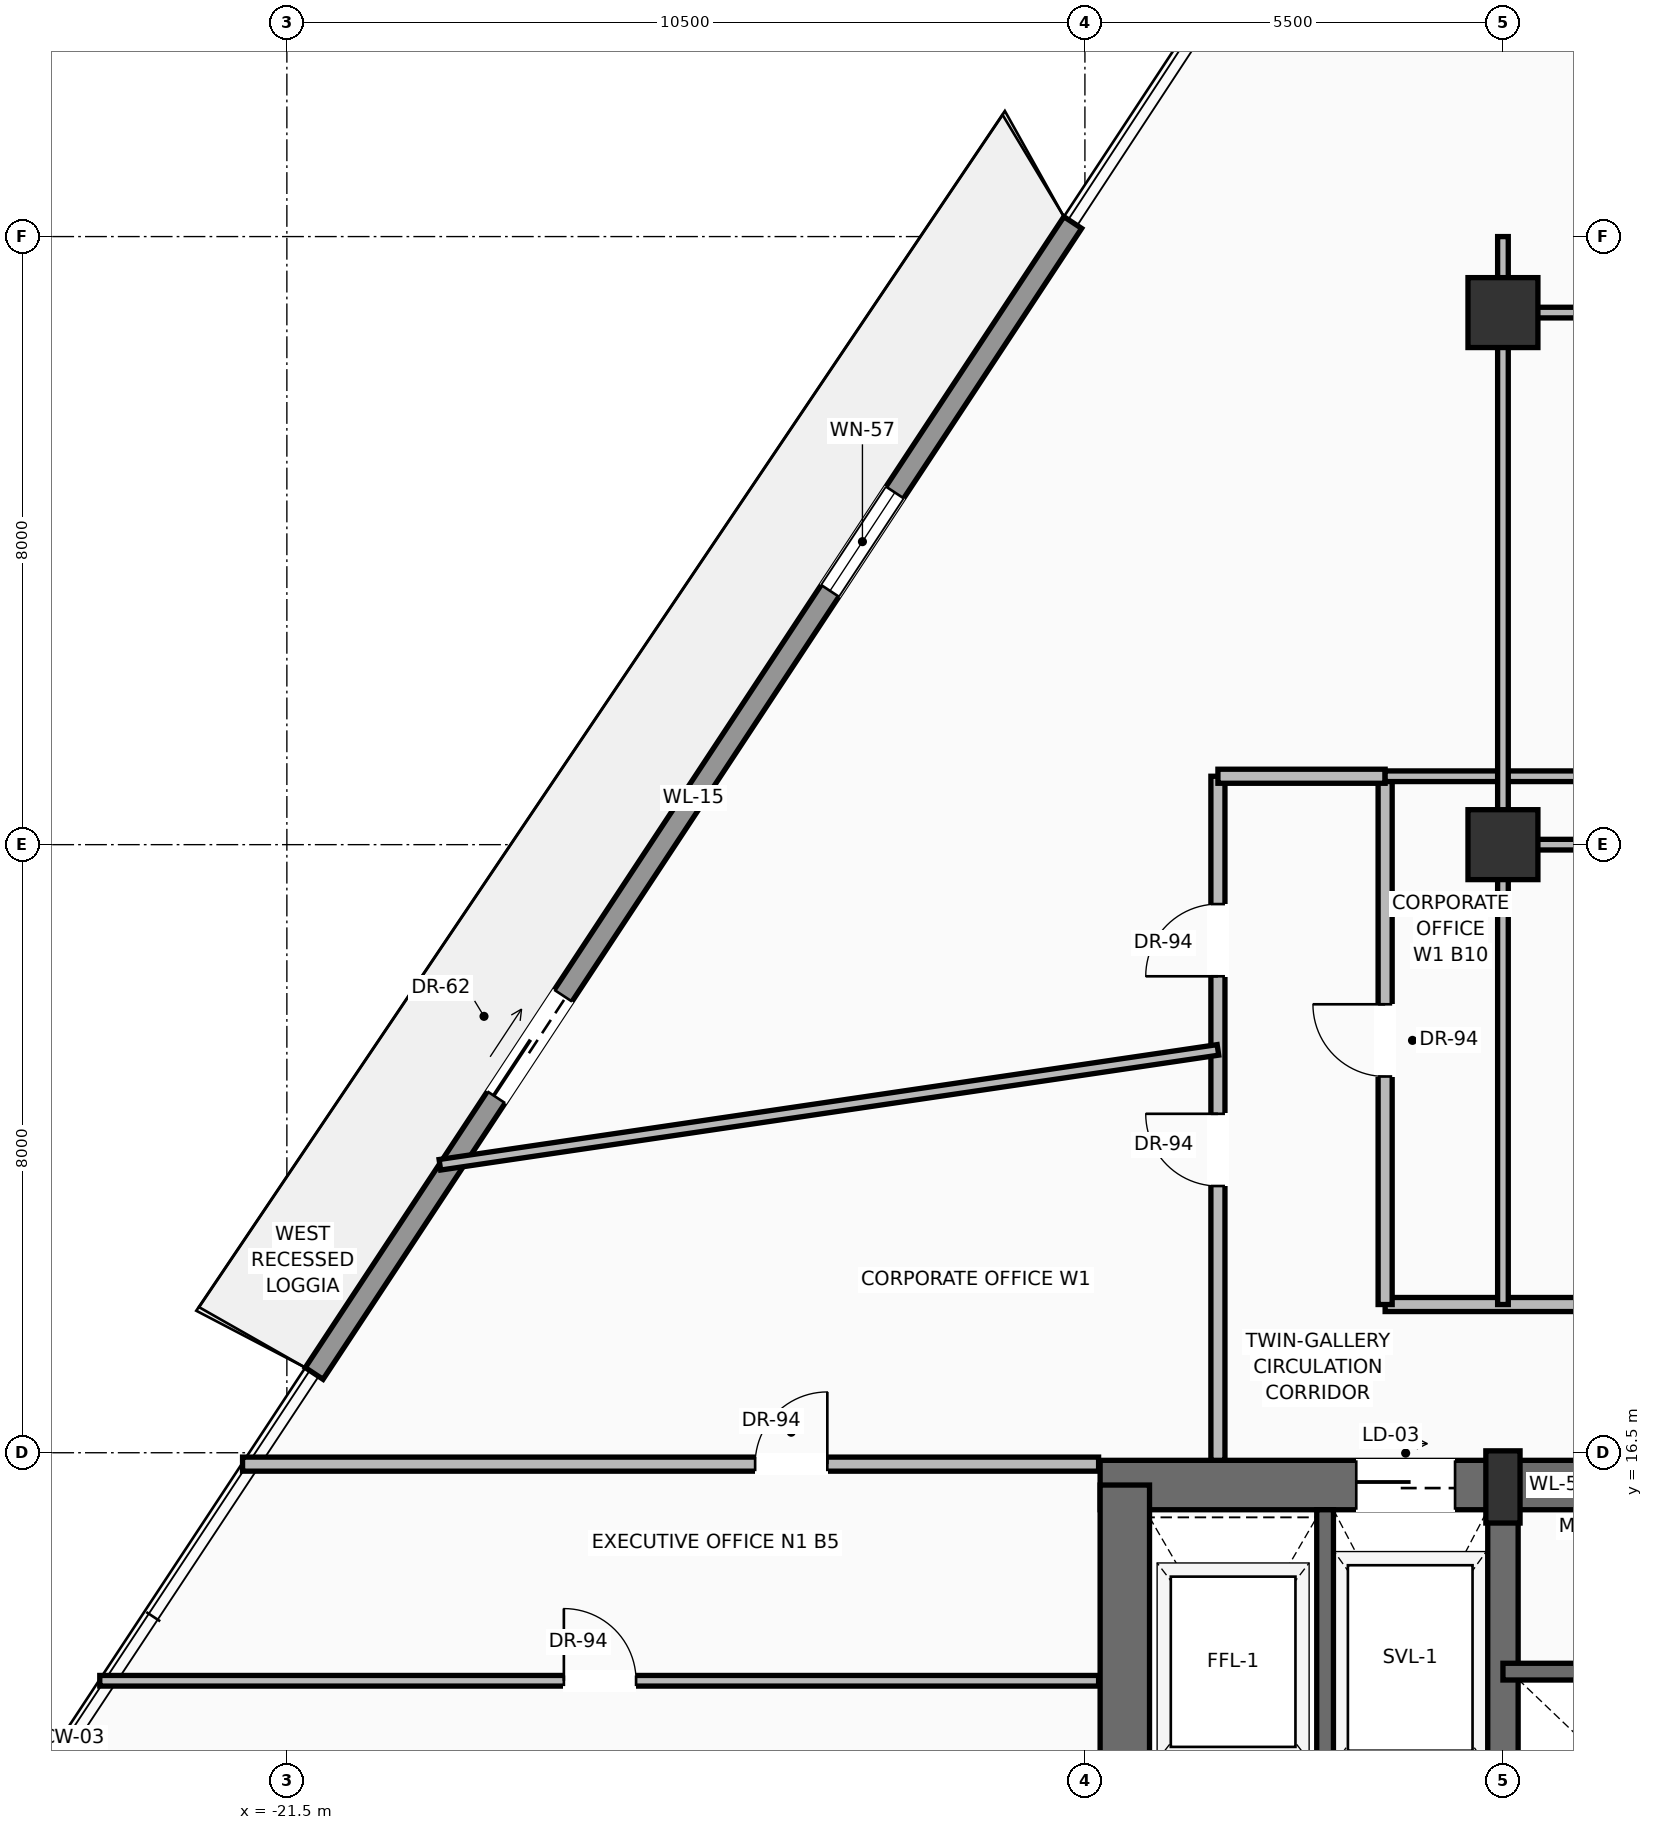
"""IFC4 building model, lengths in metres.
Left out: names, types, materials, properties, quantities, classifications, styles, units other than length and angle.
Written with IfcOpenShell. Run it as: python <this file> out.ifc"""

import sys

from ifc_helpers import new_model, si_unit, direction, frame, frame_2d, origin, origin_2d, place, context, subcontext, project, spatial, rectangle, extrude, source, transform, mapped, element, fill, save


model = new_model("IFC4")
c1 = context("Model", 3, precision=1e-05, world=origin(), true_north=direction((0.0, 1.0)))
c2 = subcontext(c1, "Body", "Model", "MODEL_VIEW")
j1 = project(units=[si_unit("LENGTHUNIT", "METRE"), si_unit("PLANEANGLEUNIT", "RADIAN")], contexts=[c1])
p1 = place(None, origin())
s1 = spatial("IfcSite", under=j1, at=p1, CompositionType="ELEMENT")
p2 = place(p1, origin())
s2 = spatial("IfcBuilding", under=s1, at=p2, CompositionType="ELEMENT")
p3 = place(p2, frame((0.0, 0.0, 125.6)))
s3 = spatial("IfcBuildingStorey", under=s2, at=p3, CompositionType="ELEMENT", Elevation=125.6)
p4 = place(p3, frame((-10.8, 16.075, 0.0), z_axis=(0.0, 0.0, 1.0), x_axis=(1.0, 0.0, 0.0)))
e1 = element("IfcWall", 1, at=p4, inside=s3, PredefinedType="SHEAR", context=c2, shape_type="SweptSolid", body=[
    extrude(rectangle(XDim=21.6, YDim=0.65, at=frame_2d((10.8, 0.0))), origin(), (0.0, 0.0, 1.0), 3.47),
])
p5 = place(p4, frame((3.37, 0.0, 0.0)))
e2 = element("IfcOpeningElement", 2, at=p5, cuts=e1, PredefinedType="OPENING", context=c2, shape_type="SweptSolid", body=[
    extrude(rectangle(XDim=1.3, YDim=2.3, at=frame_2d((0.65, 1.15))), frame((0.0, 0.335, 0.0), z_axis=(0.0, -1.0, 0.0), x_axis=(1.0, 0.0, 0.0)), (0.0, 0.0, 1.0), 0.67),
])
p6 = place(p4, frame((9.8, 0.0, 0.0)))
e3 = element("IfcOpeningElement", 3, at=p6, cuts=e1, PredefinedType="OPENING", context=c2, shape_type="SweptSolid", body=[
    extrude(rectangle(XDim=2.0, YDim=2.4, at=frame_2d((1.0, 1.2))), frame((0.0, 0.335, 0.0), z_axis=(0.0, -1.0, 0.0), x_axis=(1.0, 0.0, 0.0)), (0.0, 0.0, 1.0), 0.67),
])
p7 = place(p3, frame((-10.475, 0.525, 0.0), z_axis=(0.0, 0.0, 1.0), x_axis=(0.0, 1.0, 0.0)))
e4 = element("IfcWall", 4, at=p7, inside=s3, PredefinedType="SHEAR", context=c2, shape_type="SweptSolid", body=[
    extrude(rectangle(XDim=15.55, YDim=0.65, at=frame_2d((7.775, 0.0))), origin(), (0.0, 0.0, 1.0), 3.47),
])
p8 = place(p3, frame((-5.5, 0.525, 0.0), z_axis=(0.0, 0.0, 1.0), x_axis=(0.0, 1.0, 0.0)))
e5 = element("IfcWall", 5, at=p8, inside=s3, PredefinedType="SHEAR", context=c2, shape_type="SweptSolid", body=[
    extrude(rectangle(XDim=15.55, YDim=0.4, at=frame_2d((7.775, 0.0))), origin(), (0.0, 0.0, 1.0), 3.47),
])
p9 = place(p8, frame((8.975, 0.0, 0.0)))
e6 = element("IfcOpeningElement", 6, at=p9, cuts=e5, PredefinedType="OPENING", context=c2, shape_type="SweptSolid", body=[
    extrude(rectangle(XDim=1.1, YDim=2.2, at=frame_2d((0.55, 1.1))), frame((0.0, 0.21, 0.0), z_axis=(0.0, -1.0, 0.0), x_axis=(1.0, 0.0, 0.0)), (0.0, 0.0, 1.0), 0.42),
])
m1 = source(origin(), c2, "Body", "SweptSolid", [
    extrude(rectangle(XDim=0.45, YDim=0.95, at=origin_2d()), origin(), (0.0, 0.0, 1.0), 3.7),
])
p10 = place(p3, frame((-5.5, 16.05, 0.0), z_axis=(0.0, 0.0, 1.0), x_axis=(1.0, 0.0, 0.0)))
e7 = element("IfcColumn", 7, at=p10, inside=s3, PredefinedType="PILASTER", context=c2, shape_type="MappedRepresentation", body=[
    mapped(m1, transform((0.0, 0.0, 0.0), scale=1.0)),
])
m2 = source(origin(), c2, "Body", "SweptSolid", [
    extrude(rectangle(XDim=0.92, YDim=0.92, at=origin_2d()), origin(), (0.0, 0.0, 1.0), 3.7),
])
for number, where, z_axis, x_axis in (
    (8, (-5.5, 24.5, 0.0), (0.0, 0.0, 1.0), (1.0, 0.0, 0.0)),
    (9, (-5.5, 31.5, 0.0), (0.0, 0.0, 1.0), (1.0, 0.0, 0.0)),
):
    element("IfcColumn", number, at=place(p3, frame(where, z_axis=z_axis, x_axis=x_axis)), inside=s3, PredefinedType="COLUMN", context=c2, shape_type="MappedRepresentation", body=[
        mapped(m2, transform((0.0, 0.0, 0.0), scale=1.0)),
    ])
p11 = place(p3, frame((-21.141, 17.543, 0.0), z_axis=(0.0, 0.0, 1.0), x_axis=(0.550355807865, 0.834930227474, 0.0)))
e10 = element("IfcWall", 10, at=p11, inside=s3, PredefinedType="SOLIDWALL", context=c2, shape_type="SweptSolid", body=[
    extrude(rectangle(XDim=18.135, YDim=0.28, at=frame_2d((9.068, 0.0))), origin(), (0.0, 0.0, 1.0), 3.05),
])
p12 = place(p11, frame((4.353, 0.0, 0.0)))
e11 = element("IfcOpeningElement", 11, at=p12, cuts=e10, PredefinedType="OPENING", context=c2, shape_type="SweptSolid", body=[
    extrude(rectangle(XDim=1.6, YDim=2.35, at=frame_2d((0.8, 1.175))), frame((0.0, 0.15, 0.0), z_axis=(0.0, -1.0, 0.0), x_axis=(1.0, 0.0, 0.0)), (0.0, 0.0, 1.0), 0.3),
])
p13 = place(p11, frame((12.332, 0.0, 0.9)))
e12 = element("IfcOpeningElement", 12, at=p13, cuts=e10, PredefinedType="OPENING", context=c2, shape_type="SweptSolid", body=[
    extrude(rectangle(XDim=1.55, YDim=1.85, at=frame_2d((0.775, 0.925))), frame((0.0, 0.15, 0.0), z_axis=(0.0, -1.0, 0.0), x_axis=(1.0, 0.0, 0.0)), (0.0, 0.0, 1.0), 0.3),
])
p14 = place(p3, frame((-7.84, 11.87, 0.0), z_axis=(0.0, 0.0, 1.0), x_axis=(0.0, 1.0, 0.0)))
e13 = element("IfcWall", 13, at=p14, inside=s3, PredefinedType="SOLIDWALL", context=c2, shape_type="SweptSolid", body=[
    extrude(rectangle(XDim=3.88, YDim=0.22, at=frame_2d((1.94, 0.0))), origin(), (0.0, 0.0, 1.0), 3.47),
])
p15 = place(p3, frame((-5.5, 13.62, 0.0), z_axis=(0.0, 0.0, 1.0), x_axis=(1.0, 0.0, 0.0)))
e14 = element("IfcWall", 14, at=p15, inside=s3, PredefinedType="SOLIDWALL", context=c2, shape_type="SweptSolid", body=[
    extrude(rectangle(XDim=7.32, YDim=0.22, at=frame_2d((3.66, 0.0))), origin(), (0.0, 0.0, 1.0), 3.47),
])
p16 = place(p3, frame((-7.05, 18.45, 0.0), z_axis=(0.0, 0.0, 1.0), x_axis=(1.0, 0.0, 0.0)))
e15 = element("IfcWall", 15, at=p16, inside=s3, PredefinedType="PARTITIONING", context=c2, shape_type="SweptSolid", body=[
    extrude(rectangle(XDim=14.1, YDim=0.185, at=frame_2d((7.05, 0.0))), origin(), (0.0, 0.0, 1.0), 2.846),
])
p17 = place(p16, frame((6.575, 0.0, 0.0)))
e16 = element("IfcOpeningElement", 16, at=p17, cuts=e15, PredefinedType="OPENING", context=c2, shape_type="SweptSolid", body=[
    extrude(rectangle(XDim=0.95, YDim=2.2, at=frame_2d((0.475, 1.1))), frame((0.0, 0.103, 0.0), z_axis=(0.0, -1.0, 0.0), x_axis=(1.0, 0.0, 0.0)), (0.0, 0.0, 1.0), 0.205),
])
p18 = place(p3, frame((-7.05, 18.45, 0.0), z_axis=(0.0, 0.0, 1.0), x_axis=(0.0, 1.0, 0.0)))
e17 = element("IfcWall", 17, at=p18, inside=s3, PredefinedType="PARTITIONING", context=c2, shape_type="SweptSolid", body=[
    extrude(rectangle(XDim=6.95, YDim=0.185, at=frame_2d((3.475, 0.0))), origin(), (0.0, 0.0, 1.0), 2.846),
])
p19 = place(p18, frame((3.0, 0.0, 0.0)))
e18 = element("IfcOpeningElement", 18, at=p19, cuts=e17, PredefinedType="OPENING", context=c2, shape_type="SweptSolid", body=[
    extrude(rectangle(XDim=0.95, YDim=2.2, at=frame_2d((0.475, 1.1))), frame((0.0, 0.103, 0.0), z_axis=(0.0, -1.0, 0.0), x_axis=(1.0, 0.0, 0.0)), (0.0, 0.0, 1.0), 0.205),
])
p20 = place(p3, frame((-9.25, 16.4, 0.0), z_axis=(0.0, 0.0, 1.0), x_axis=(0.0, 1.0, 0.0)))
e19 = element("IfcWall", 19, at=p20, inside=s3, PredefinedType="PARTITIONING", context=c2, shape_type="SweptSolid", body=[
    extrude(rectangle(XDim=9.0, YDim=0.185, at=frame_2d((4.5, 0.0))), origin(), (0.0, 0.0, 1.0), 2.846),
])
p21 = place(p20, frame((3.609, 0.0, 0.0)))
e20 = element("IfcOpeningElement", 20, at=p21, cuts=e19, PredefinedType="OPENING", context=c2, shape_type="SweptSolid", body=[
    extrude(rectangle(XDim=0.95, YDim=2.2, at=frame_2d((0.475, 1.1))), frame((0.0, 0.103, 0.0), z_axis=(0.0, -1.0, 0.0), x_axis=(1.0, 0.0, 0.0)), (0.0, 0.0, 1.0), 0.205),
])
p22 = place(p20, frame((6.368, 0.0, 0.0)))
e21 = element("IfcOpeningElement", 21, at=p22, cuts=e19, PredefinedType="OPENING", context=c2, shape_type="SweptSolid", body=[
    extrude(rectangle(XDim=0.95, YDim=2.2, at=frame_2d((0.475, 1.1))), frame((0.0, 0.103, 0.0), z_axis=(0.0, -1.0, 0.0), x_axis=(1.0, 0.0, 0.0)), (0.0, 0.0, 1.0), 0.205),
])
p23 = place(p3, frame((-9.25, 25.4, 0.0), z_axis=(0.0, 0.0, 1.0), x_axis=(1.0, 0.0, 0.0)))
e22 = element("IfcWall", 22, at=p23, inside=s3, PredefinedType="PARTITIONING", context=c2, shape_type="SweptSolid", body=[
    extrude(rectangle(XDim=2.2, YDim=0.185, at=frame_2d((1.1, 0.0))), origin(), (0.0, 0.0, 1.0), 3.462),
])
p24 = place(p3, frame((-22.083, 16.35, 0.0), z_axis=(0.0, 0.0, 1.0), x_axis=(1.0, 0.0, 0.0)))
e23 = element("IfcWall", 23, at=p24, inside=s3, PredefinedType="PARTITIONING", context=c2, shape_type="SweptSolid", body=[
    extrude(rectangle(XDim=11.263, YDim=0.185, at=frame_2d((5.631, 0.0))), origin(), (0.0, 0.0, 1.0), 3.462),
])
p25 = place(p24, frame((6.744, 0.0, 0.0)))
e24 = element("IfcOpeningElement", 24, at=p25, cuts=e23, PredefinedType="OPENING", context=c2, shape_type="SweptSolid", body=[
    extrude(rectangle(XDim=0.95, YDim=2.2, at=frame_2d((0.475, 1.1))), frame((0.0, 0.103, 0.0), z_axis=(0.0, -1.0, 0.0), x_axis=(1.0, 0.0, 0.0)), (0.0, 0.0, 1.0), 0.205),
])
p26 = place(p3, frame((-7.05, 25.4, 0.0), z_axis=(0.0, 0.0, 1.0), x_axis=(1.0, 0.0, 0.0)))
e25 = element("IfcWall", 25, at=p26, inside=s3, PredefinedType="PARTITIONING", context=c2, shape_type="SweptSolid", body=[
    extrude(rectangle(XDim=14.1, YDim=0.14, at=frame_2d((7.05, 0.0))), origin(), (0.0, 0.0, 1.0), 3.462),
])
p27 = place(p26, frame((6.575, 0.0, 0.0)))
e26 = element("IfcOpeningElement", 26, at=p27, cuts=e25, PredefinedType="OPENING", context=c2, shape_type="SweptSolid", body=[
    extrude(rectangle(XDim=0.95, YDim=2.2, at=frame_2d((0.475, 1.1))), frame((0.0, 0.08, 0.0), z_axis=(0.0, -1.0, 0.0), x_axis=(1.0, 0.0, 0.0)), (0.0, 0.0, 1.0), 0.16),
])
p28 = place(p3, frame((-5.5, 18.45, 0.0), z_axis=(0.0, 0.0, 1.0), x_axis=(0.0, 1.0, 0.0)))
e27 = element("IfcWall", 27, at=p28, inside=s3, PredefinedType="PARTITIONING", context=c2, shape_type="SweptSolid", body=[
    extrude(rectangle(XDim=14.05, YDim=0.14, at=frame_2d((7.025, 0.0))), origin(), (0.0, 0.0, 1.0), 2.846),
])
p29 = place(p3, frame((-5.5, 24.5, 0.0), z_axis=(0.0, 0.0, 1.0), x_axis=(1.0, 0.0, 0.0)))
e28 = element("IfcWall", 28, at=p29, inside=s3, PredefinedType="PARTITIONING", context=c2, shape_type="SweptSolid", body=[
    extrude(rectangle(XDim=11.0, YDim=0.14, at=frame_2d((5.5, 0.0))), origin(), (0.0, 0.0, 1.0), 2.846),
])
p30 = place(p29, frame((5.025, 0.0, 0.0)))
e29 = element("IfcOpeningElement", 29, at=p30, cuts=e28, PredefinedType="OPENING", context=c2, shape_type="SweptSolid", body=[
    extrude(rectangle(XDim=0.95, YDim=2.2, at=frame_2d((0.475, 1.1))), frame((0.0, 0.08, 0.0), z_axis=(0.0, -1.0, 0.0), x_axis=(1.0, 0.0, 0.0)), (0.0, 0.0, 1.0), 0.16),
])
p31 = place(p3, frame((-5.5, 31.5, 0.0), z_axis=(0.0, 0.0, 1.0), x_axis=(1.0, 0.0, 0.0)))
e30 = element("IfcWall", 30, at=p31, inside=s3, PredefinedType="PARTITIONING", context=c2, shape_type="SweptSolid", body=[
    extrude(rectangle(XDim=11.0, YDim=0.14, at=frame_2d((5.5, 0.0))), origin(), (0.0, 0.0, 1.0), 2.846),
])
p32 = place(p3, frame((-23.962, 13.5, 0.0), z_axis=(0.0, 0.0, 1.0), x_axis=(1.0, 0.0, 0.0)))
e31 = element("IfcWall", 31, at=p32, inside=s3, PredefinedType="PARTITIONING", context=c2, shape_type="SweptSolid", body=[
    extrude(rectangle(XDim=13.142, YDim=0.14, at=frame_2d((6.571, 0.0))), origin(), (0.0, 0.0, 1.0), 3.049),
])
p33 = place(p32, frame((6.106, 0.0, 0.0)))
e32 = element("IfcOpeningElement", 32, at=p33, cuts=e31, PredefinedType="OPENING", context=c2, shape_type="SweptSolid", body=[
    extrude(rectangle(XDim=0.95, YDim=2.2, at=frame_2d((0.475, 1.1))), frame((0.0, 0.08, 0.0), z_axis=(0.0, -1.0, 0.0), x_axis=(1.0, 0.0, 0.0)), (0.0, 0.0, 1.0), 0.16),
])
p34 = place(p3, frame((-19.487, 20.288, 0.0), z_axis=(0.0, 0.0, 1.0), x_axis=(0.989271254503, 0.146090331693, 0.0)))
e33 = element("IfcWall", 33, at=p34, inside=s3, PredefinedType="PARTITIONING", context=c2, shape_type="SweptSolid", body=[
    extrude(rectangle(XDim=10.348, YDim=0.14, at=frame_2d((5.174, 0.0))), origin(), (0.0, 0.0, 1.0), 3.462),
])
m3 = source(origin(), c2, "Body", "SweptSolid", [
    extrude(rectangle(XDim=1.6, YDim=2.35, at=frame_2d((0.8, 1.175))), frame((0.0, 0.025, 0.0), z_axis=(0.0, -1.0, 0.0), x_axis=(1.0, 0.0, 0.0)), (0.0, 0.0, 1.0), 0.05),
])
p35 = place(p12, origin())
e34 = element("IfcDoor", 34, at=p35, inside=s3, OperationType="SLIDING_TO_LEFT", PredefinedType="DOOR", context=c2, shape_type="MappedRepresentation", body=[
    mapped(m3, transform((0.0, 0.0, 0.0), scale=1.0)),
])
fill(e11, e34)
m4 = source(origin(), c2, "Body", "SweptSolid", [
    extrude(rectangle(XDim=1.55, YDim=1.85, at=frame_2d((0.775, 0.925))), frame((0.0, 0.03, 0.0), z_axis=(0.0, -1.0, 0.0), x_axis=(1.0, 0.0, 0.0)), (0.0, 0.0, 1.0), 0.06),
])
p36 = place(p13, origin())
e35 = element("IfcWindow", 35, at=p36, inside=s3, PartitioningType="SINGLE_PANEL", PredefinedType="WINDOW", context=c2, shape_type="MappedRepresentation", body=[
    mapped(m4, transform((0.0, 0.0, 0.0), scale=1.0)),
])
fill(e12, e35)
m5 = source(origin(), c2, "Body", "SweptSolid", [
    extrude(rectangle(XDim=1.3, YDim=2.3, at=frame_2d((0.65, 1.15))), frame((0.0, 0.025, 0.0), z_axis=(0.0, -1.0, 0.0), x_axis=(1.0, 0.0, 0.0)), (0.0, 0.0, 1.0), 0.05),
])
p37 = place(p5, origin())
e36 = element("IfcDoor", 36, at=p37, inside=s3, OperationType="SLIDING_TO_RIGHT", PredefinedType="DOOR", context=c2, shape_type="MappedRepresentation", body=[
    mapped(m5, transform((0.0, 0.0, 0.0), scale=1.0)),
])
fill(e2, e36)
m6 = source(origin(), c2, "Body", "SweptSolid", [
    extrude(rectangle(XDim=0.95, YDim=2.2, at=frame_2d((0.475, 1.1))), frame((0.0, 0.025, 0.0), z_axis=(0.0, -1.0, 0.0), x_axis=(1.0, 0.0, 0.0)), (0.0, 0.0, 1.0), 0.05),
])
p38 = place(p21, origin())
e37 = element("IfcDoor", 37, at=p38, inside=s3, OperationType="SINGLE_SWING_RIGHT", PredefinedType="DOOR", context=c2, shape_type="MappedRepresentation", body=[
    mapped(m6, transform((0.0, 0.0, 0.0), scale=1.0)),
])
fill(e20, e37)
p39 = place(p25, origin())
e38 = element("IfcDoor", 38, at=p39, inside=s3, OperationType="SINGLE_SWING_RIGHT", PredefinedType="DOOR", context=c2, shape_type="MappedRepresentation", body=[
    mapped(m6, transform((0.0, 0.0, 0.0), scale=1.0)),
])
fill(e24, e38)
p40 = place(p33, origin())
e39 = element("IfcDoor", 39, at=p40, inside=s3, OperationType="SINGLE_SWING_LEFT", PredefinedType="DOOR", context=c2, shape_type="MappedRepresentation", body=[
    mapped(m6, transform((0.0, 0.0, 0.0), scale=1.0)),
])
fill(e32, e39)
p41 = place(p19, origin())
e40 = element("IfcDoor", 40, at=p41, inside=s3, OperationType="SINGLE_SWING_RIGHT", PredefinedType="DOOR", context=c2, shape_type="MappedRepresentation", body=[
    mapped(m6, transform((0.0, 0.0, 0.0), scale=1.0)),
])
fill(e18, e40)
p42 = place(p22, origin())
e41 = element("IfcDoor", 41, at=p42, inside=s3, OperationType="SINGLE_SWING_LEFT", PredefinedType="DOOR", context=c2, shape_type="MappedRepresentation", body=[
    mapped(m6, transform((0.0, 0.0, 0.0), scale=1.0)),
])
fill(e21, e41)
save(model, sys.argv[1])
